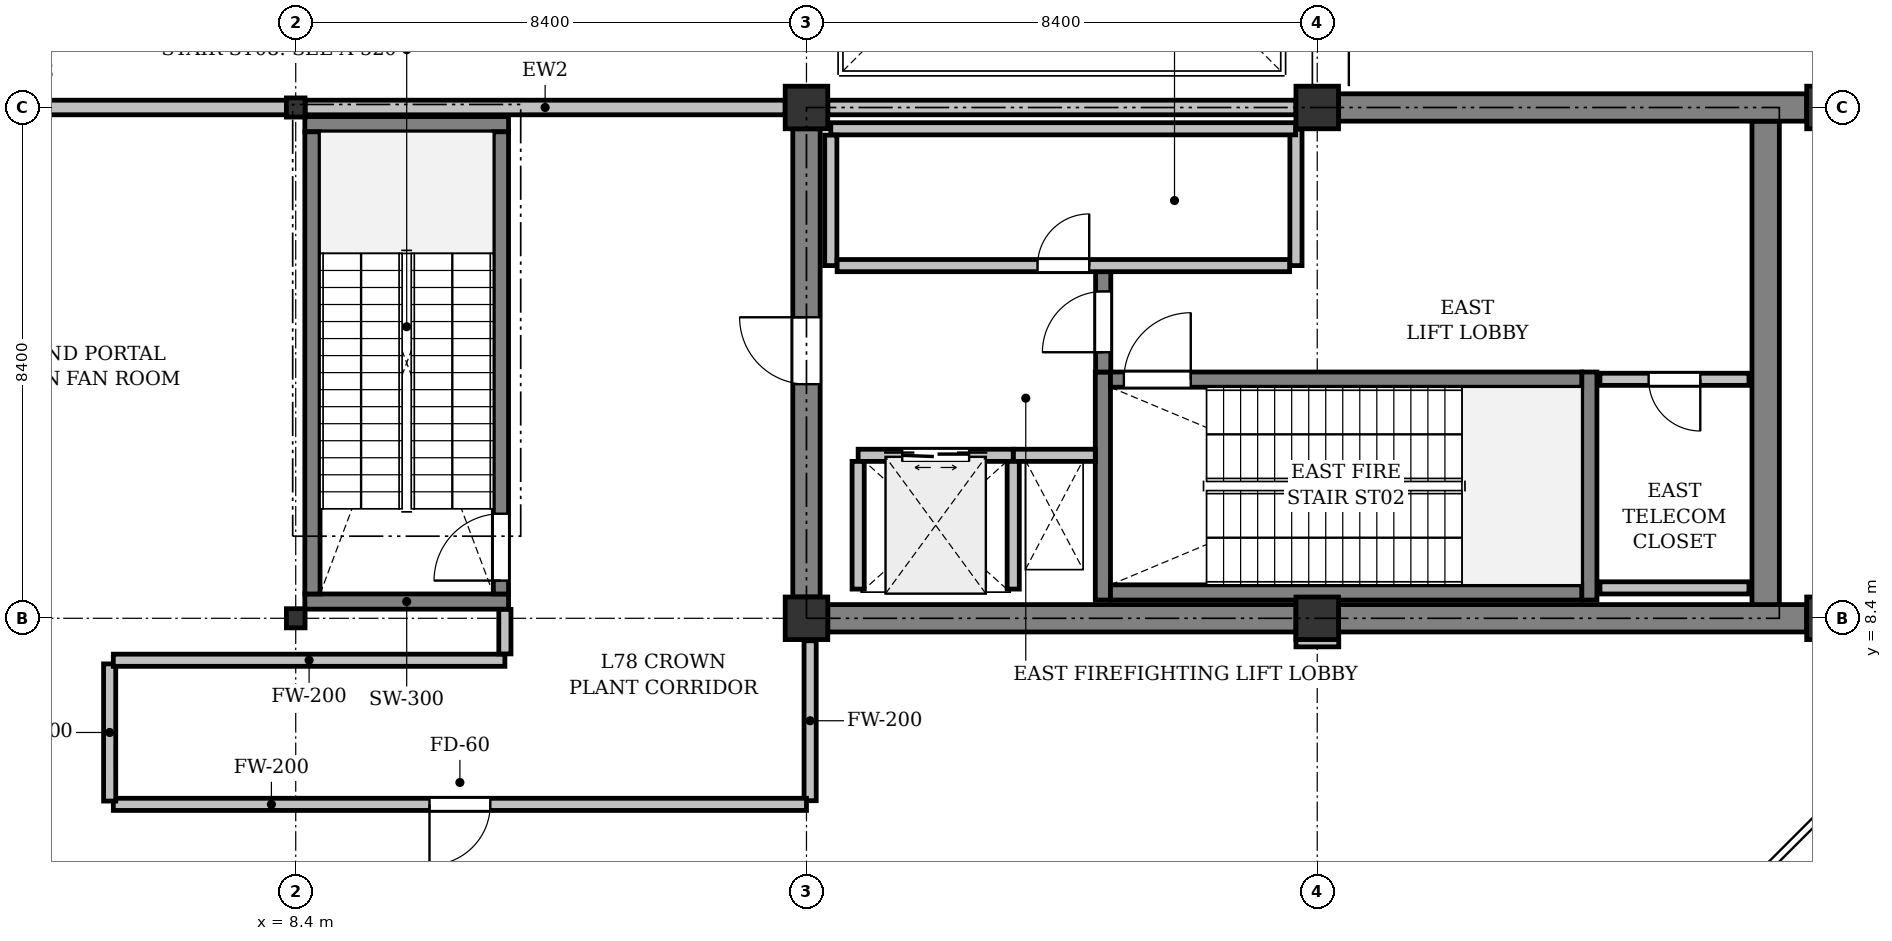
"""IFC4 building model, lengths in metres.
Left out: names, types, materials, properties, quantities, classifications, styles, units other than length and angle.
Written with IfcOpenShell. Run it as: python <this file> out.ifc"""

import sys

from ifc_helpers import new_model, si_unit, direction, frame, frame_2d, origin, origin_2d, place, context, subcontext, project, spatial, rectangle, i_section, extrude, element, fill, save


model = new_model("IFC4")
c1 = context("Model", 3, precision=1e-05, world=origin(), true_north=direction((0.0, 1.0)))
c2 = subcontext(c1, "Body", "Model", "MODEL_VIEW")
j1 = project(units=[si_unit("LENGTHUNIT", "METRE"), si_unit("PLANEANGLEUNIT", "RADIAN")], contexts=[c1])
p1 = place(None, origin())
s1 = spatial("IfcSite", under=j1, at=p1, CompositionType="ELEMENT")
p2 = place(p1, origin())
s2 = spatial("IfcBuilding", under=s1, at=p2, CompositionType="ELEMENT")
p3 = place(p2, frame((0.0, 0.0, 327.0)))
s3 = spatial("IfcBuildingStorey", under=s2, at=p3, CompositionType="ELEMENT", Elevation=327.0)
for number, where, z_axis, x_axis in (
    (1, (8.4, 8.4, 0.0), (0.0, 0.0, 1.0), (1.0, 0.0, 0.0)),
    (2, (8.4, 16.8, 0.0), (0.0, 0.0, 1.0), (1.0, 0.0, 0.0)),
):
    element("IfcColumn", number, at=place(p3, frame(where, z_axis=z_axis, x_axis=x_axis)), inside=s3, PredefinedType="COLUMN", context=c2, shape_type="SweptSolid", body=[
        extrude(i_section(OverallWidth=0.307, OverallDepth=0.315, WebThickness=0.012, FlangeThickness=0.019, FilletRadius=0.017, at=origin_2d()), origin(), (0.0, 0.0, 1.0), 5.725),
    ])
for number, where, z_axis, x_axis in (
    (3, (16.8, 8.4, 0.0), (0.0, 0.0, 1.0), (1.0, 0.0, 0.0)),
    (4, (16.8, 16.8, 0.0), (0.0, 0.0, 1.0), (1.0, 0.0, 0.0)),
    (5, (25.2, 8.4, 0.0), (0.0, 0.0, 1.0), (1.0, 0.0, 0.0)),
    (6, (25.2, 16.8, 0.0), (0.0, 0.0, 1.0), (1.0, 0.0, 0.0)),
    (7, (33.6, 8.4, 0.0), (0.0, 0.0, 1.0), (1.0, 0.0, 0.0)),
    (8, (33.6, 16.8, 0.0), (0.0, 0.0, 1.0), (1.0, 0.0, 0.0)),
):
    element("IfcColumn", number, at=place(p3, frame(where, z_axis=z_axis, x_axis=x_axis)), inside=s3, PredefinedType="COLUMN", context=c2, shape_type="SweptSolid", body=[
        extrude(rectangle(XDim=0.7, YDim=0.7, at=origin_2d()), origin(), (0.0, 0.0, 1.0), 5.725),
    ])
p4 = place(p3, frame((-0.12, 16.8, 0.0), z_axis=(0.0, 0.0, 1.0), x_axis=(1.0, 0.0, 0.0)))
e9 = element("IfcWall", 9, at=p4, inside=s3, PredefinedType="STANDARD", context=c2, shape_type="SweptSolid", body=[
    extrude(rectangle(XDim=8.367, YDim=0.24, at=frame_2d((4.183, 0.0))), origin(), (0.0, 0.0, 1.0), 5.725),
])
p5 = place(p3, frame((8.553, 16.8, 0.0), z_axis=(0.0, 0.0, 1.0), x_axis=(1.0, 0.0, 0.0)))
e10 = element("IfcWall", 10, at=p5, inside=s3, PredefinedType="STANDARD", context=c2, shape_type="SweptSolid", body=[
    extrude(rectangle(XDim=7.896, YDim=0.24, at=frame_2d((3.948, 0.0))), origin(), (0.0, 0.0, 1.0), 5.366),
])
p6 = place(p3, frame((17.15, 16.8, 0.0), z_axis=(0.0, 0.0, 1.0), x_axis=(1.0, 0.0, 0.0)))
e11 = element("IfcWall", 11, at=p6, inside=s3, PredefinedType="STANDARD", context=c2, shape_type="SweptSolid", body=[
    extrude(rectangle(XDim=7.7, YDim=0.24, at=frame_2d((3.85, 0.0))), origin(), (0.0, 0.0, 1.0), 5.366),
])
p7 = place(p3, frame((17.15, 8.4, 0.0), z_axis=(0.0, 0.0, 1.0), x_axis=(1.0, 0.0, 0.0)))
e12 = element("IfcWall", 12, at=p7, inside=s3, PredefinedType="SHEAR", context=c2, shape_type="SweptSolid", body=[
    extrude(rectangle(XDim=7.7, YDim=0.45, at=frame_2d((3.85, 0.0))), origin(), (0.0, 0.0, 1.0), 5.725),
])
p8 = place(p3, frame((25.55, 8.4, 0.0), z_axis=(0.0, 0.0, 1.0), x_axis=(1.0, 0.0, 0.0)))
e13 = element("IfcWall", 13, at=p8, inside=s3, PredefinedType="SHEAR", context=c2, shape_type="SweptSolid", body=[
    extrude(rectangle(XDim=7.7, YDim=0.45, at=frame_2d((3.85, 0.0))), origin(), (0.0, 0.0, 1.0), 5.725),
])
p9 = place(p3, frame((32.575, 8.625, 0.0), z_axis=(0.0, 0.0, 1.0), x_axis=(0.0, 1.0, 0.0)))
e14 = element("IfcWall", 14, at=p9, inside=s3, PredefinedType="SHEAR", context=c2, shape_type="SweptSolid", body=[
    extrude(rectangle(XDim=7.95, YDim=0.45, at=frame_2d((3.975, 0.0))), origin(), (0.0, 0.0, 1.0), 5.725),
])
p10 = place(p3, frame((16.8, 8.75, 0.0), z_axis=(0.0, 0.0, 1.0), x_axis=(0.0, 1.0, 0.0)))
e15 = element("IfcWall", 15, at=p10, inside=s3, PredefinedType="SHEAR", context=c2, shape_type="SweptSolid", body=[
    extrude(rectangle(XDim=7.7, YDim=0.45, at=frame_2d((3.85, 0.0))), origin(), (0.0, 0.0, 1.0), 5.725),
])
p11 = place(p10, frame((3.5, 0.0, 0.0)))
e16 = element("IfcOpeningElement", 16, at=p11, cuts=e15, PredefinedType="OPENING", context=c2, shape_type="SweptSolid", body=[
    extrude(rectangle(XDim=1.1, YDim=2.15, at=frame_2d((0.55, 1.075))), frame((0.0, 0.235, 0.0), z_axis=(0.0, -1.0, 0.0), x_axis=(1.0, 0.0, 0.0)), (0.0, 0.0, 1.0), 0.47),
])
p12 = place(p3, frame((25.55, 16.8, 0.0), z_axis=(0.0, 0.0, 1.0), x_axis=(1.0, 0.0, 0.0)))
e17 = element("IfcWall", 17, at=p12, inside=s3, PredefinedType="SHEAR", context=c2, shape_type="SweptSolid", body=[
    extrude(rectangle(XDim=7.7, YDim=0.45, at=frame_2d((3.85, 0.0))), origin(), (0.0, 0.0, 1.0), 5.725),
])
for number, where, z_axis, x_axis in (
    (18, (21.675, 8.7, 0.0), (0.0, 0.0, 1.0), (0.0, 1.0, 0.0)),
    (19, (29.675, 8.7, 0.0), (0.0, 0.0, 1.0), (0.0, 1.0, 0.0)),
):
    element("IfcWall", number, at=place(p3, frame(where, z_axis=z_axis, x_axis=x_axis)), inside=s3, PredefinedType="SHEAR", context=c2, shape_type="SweptSolid", body=[
        extrude(rectangle(XDim=3.75, YDim=0.25, at=frame_2d((1.875, 0.0))), origin(), (0.0, 0.0, 1.0), 5.725),
    ])
p13 = place(p3, frame((21.8, 8.825, 0.0), z_axis=(0.0, 0.0, 1.0), x_axis=(1.0, 0.0, 0.0)))
e20 = element("IfcWall", 20, at=p13, inside=s3, PredefinedType="SHEAR", context=c2, shape_type="SweptSolid", body=[
    extrude(rectangle(XDim=7.75, YDim=0.25, at=frame_2d((3.875, 0.0))), origin(), (0.0, 0.0, 1.0), 5.725),
])
p14 = place(p3, frame((21.8, 12.325, 0.0), z_axis=(0.0, 0.0, 1.0), x_axis=(1.0, 0.0, 0.0)))
e21 = element("IfcWall", 21, at=p14, inside=s3, PredefinedType="SHEAR", context=c2, shape_type="SweptSolid", body=[
    extrude(rectangle(XDim=7.75, YDim=0.25, at=frame_2d((3.875, 0.0))), origin(), (0.0, 0.0, 1.0), 5.725),
])
p15 = place(p14, frame((0.22, 0.0, 0.0)))
e22 = element("IfcOpeningElement", 22, at=p15, cuts=e21, PredefinedType="OPENING", context=c2, shape_type="SweptSolid", body=[
    extrude(rectangle(XDim=1.1, YDim=2.15, at=frame_2d((0.55, 1.075))), frame((0.0, 0.135, 0.0), z_axis=(0.0, -1.0, 0.0), x_axis=(1.0, 0.0, 0.0)), (0.0, 0.0, 1.0), 0.27),
])
for number, where, z_axis, x_axis in (
    (23, (11.9, 8.675, -0.35), (0.0, 0.0, 1.0), (-1.0, 0.0, 0.0)),
    (24, (11.9, 16.525, -0.35), (0.0, 0.0, 1.0), (-1.0, 0.0, 0.0)),
):
    element("IfcWall", number, at=place(p3, frame(where, z_axis=z_axis, x_axis=x_axis)), inside=s3, PredefinedType="SHEAR", context=c2, shape_type="SweptSolid", body=[
        extrude(rectangle(XDim=3.35, YDim=0.25, at=frame_2d((1.675, 0.0))), origin(), (0.0, 0.0, 1.0), 6.075),
    ])
p16 = place(p3, frame((11.775, 8.8, -0.35), z_axis=(0.0, 0.0, 1.0), x_axis=(0.0, 1.0, 0.0)))
e25 = element("IfcWall", 25, at=p16, inside=s3, PredefinedType="SHEAR", context=c2, shape_type="SweptSolid", body=[
    extrude(rectangle(XDim=7.6, YDim=0.25, at=frame_2d((3.8, 0.0))), origin(), (0.0, 0.0, 1.0), 6.075),
])
p17 = place(p16, frame((0.22, 0.0, 0.35)))
e26 = element("IfcOpeningElement", 26, at=p17, cuts=e25, PredefinedType="OPENING", context=c2, shape_type="SweptSolid", body=[
    extrude(rectangle(XDim=1.1, YDim=2.15, at=frame_2d((0.55, 1.075))), frame((0.0, 0.135, 0.0), z_axis=(0.0, -1.0, 0.0), x_axis=(1.0, 0.0, 0.0)), (0.0, 0.0, 1.0), 0.27),
])
p18 = place(p3, frame((8.675, 8.8, -0.35), z_axis=(0.0, 0.0, 1.0), x_axis=(0.0, 1.0, 0.0)))
e27 = element("IfcWall", 27, at=p18, inside=s3, PredefinedType="SHEAR", context=c2, shape_type="SweptSolid", body=[
    extrude(rectangle(XDim=7.6, YDim=0.25, at=frame_2d((3.8, 0.0))), origin(), (0.0, 0.0, 1.0), 6.075),
])
p19 = place(p3, frame((20.2, 11.08, 0.0), z_axis=(0.0, 0.0, 1.0), x_axis=(1.0, 0.0, 0.0)))
e28 = element("IfcWall", 28, at=p19, inside=s3, PredefinedType="PARTITIONING", context=c2, shape_type="SweptSolid", body=[
    extrude(rectangle(XDim=1.35, YDim=0.2, at=frame_2d((0.675, 0.0))), origin(), (0.0, 0.0, 1.0), 5.725),
])
p20 = place(p3, frame((21.68, 12.45, 0.0), z_axis=(0.0, 0.0, 1.0), x_axis=(0.0, 1.0, 0.0)))
e29 = element("IfcWall", 29, at=p20, inside=s3, PredefinedType="SHEAR", context=c2, shape_type="SweptSolid", body=[
    extrude(rectangle(XDim=1.65, YDim=0.25, at=frame_2d((0.825, 0.0))), origin(), (0.0, 0.0, 1.0), 5.725),
])
p21 = place(p20, frame((0.325, 0.0, 0.0)))
e30 = element("IfcOpeningElement", 30, at=p21, cuts=e29, PredefinedType="OPENING", context=c2, shape_type="SweptSolid", body=[
    extrude(rectangle(XDim=1.0, YDim=2.15, at=frame_2d((0.5, 1.075))), frame((0.0, 0.135, 0.0), z_axis=(0.0, -1.0, 0.0), x_axis=(1.0, 0.0, 0.0)), (0.0, 0.0, 1.0), 0.27),
])
p22 = place(p3, frame((17.65, 11.08, 0.0), z_axis=(0.0, 0.0, 1.0), x_axis=(1.0, 0.0, 0.0)))
e31 = element("IfcWall", 31, at=p22, inside=s3, PredefinedType="PARTITIONING", context=c2, shape_type="SweptSolid", body=[
    extrude(rectangle(XDim=2.55, YDim=0.2, at=frame_2d((1.275, 0.0))), origin(), (0.0, 0.0, 1.0), 5.725),
])
p23 = place(p22, frame((0.725, 0.0, 0.0)))
e32 = element("IfcOpeningElement", 32, at=p23, cuts=e31, PredefinedType="OPENING", context=c2, shape_type="SweptSolid", body=[
    extrude(rectangle(XDim=1.1, YDim=2.2, at=frame_2d((0.55, 1.1))), frame((0.0, 0.11, 0.0), z_axis=(0.0, -1.0, 0.0), x_axis=(1.0, 0.0, 0.0)), (0.0, 0.0, 1.0), 0.22),
])
for number, where, z_axis, x_axis in (
    (33, (20.2, 8.88, 0.0), (0.0, 0.0, 1.0), (0.0, 1.0, 0.0)),
    (34, (17.65, 8.88, 0.0), (0.0, 0.0, 1.0), (0.0, 1.0, 0.0)),
):
    element("IfcWall", number, at=place(p3, frame(where, z_axis=z_axis, x_axis=x_axis)), inside=s3, PredefinedType="PARTITIONING", context=c2, shape_type="SweptSolid", body=[
        extrude(rectangle(XDim=2.1, YDim=0.2, at=frame_2d((1.05, 0.0))), origin(), (0.0, 0.0, 1.0), 5.725),
    ])
p24 = place(p3, frame((24.85, 14.2, 0.0), z_axis=(0.0, 0.0, 1.0), x_axis=(0.0, 1.0, 0.0)))
e35 = element("IfcWall", 35, at=p24, inside=s3, PredefinedType="PARTITIONING", context=c2, shape_type="SweptSolid", body=[
    extrude(rectangle(XDim=2.245, YDim=0.2, at=frame_2d((1.123, 0.0))), origin(), (0.0, 0.0, 1.0), 5.725),
])
p25 = place(p3, frame((24.845, 16.45, 0.0), z_axis=(0.0, 0.0, 1.0), x_axis=(-1.0, 0.0, 0.0)))
e36 = element("IfcWall", 36, at=p25, inside=s3, PredefinedType="PARTITIONING", context=c2, shape_type="SweptSolid", body=[
    extrude(rectangle(XDim=7.645, YDim=0.2, at=frame_2d((3.823, 0.0))), origin(), (0.0, 0.0, 1.0), 5.725),
])
p26 = place(p3, frame((17.2, 16.346, 0.0), z_axis=(0.0, 0.0, 1.0), x_axis=(0.0, -1.0, 0.0)))
e37 = element("IfcWall", 37, at=p26, inside=s3, PredefinedType="PARTITIONING", context=c2, shape_type="SweptSolid", body=[
    extrude(rectangle(XDim=2.146, YDim=0.2, at=frame_2d((1.073, 0.0))), origin(), (0.0, 0.0, 1.0), 5.725),
])
p27 = place(p3, frame((17.304, 14.2, 0.0), z_axis=(0.0, 0.0, 1.0), x_axis=(1.0, 0.0, 0.0)))
e38 = element("IfcWall", 38, at=p27, inside=s3, PredefinedType="PARTITIONING", context=c2, shape_type="SweptSolid", body=[
    extrude(rectangle(XDim=7.442, YDim=0.2, at=frame_2d((3.721, 0.0))), origin(), (0.0, 0.0, 1.0), 5.725),
])
p28 = place(p27, frame((3.296, 0.0, 0.0)))
e39 = element("IfcOpeningElement", 39, at=p28, cuts=e38, PredefinedType="OPENING", context=c2, shape_type="SweptSolid", body=[
    extrude(rectangle(XDim=0.85, YDim=2.15, at=frame_2d((0.425, 1.075))), frame((0.0, 0.11, 0.0), z_axis=(0.0, -1.0, 0.0), x_axis=(1.0, 0.0, 0.0)), (0.0, 0.0, 1.0), 0.22),
])
p29 = place(p3, frame((32.3, 12.33, 0.0), z_axis=(0.0, 0.0, 1.0), x_axis=(-1.0, 0.0, 0.0)))
e40 = element("IfcWall", 40, at=p29, inside=s3, PredefinedType="PARTITIONING", context=c2, shape_type="SweptSolid", body=[
    extrude(rectangle(XDim=2.45, YDim=0.2, at=frame_2d((1.225, 0.0))), origin(), (0.0, 0.0, 1.0), 5.725),
])
p30 = place(p29, frame((0.8, 0.0, 0.0)))
e41 = element("IfcOpeningElement", 41, at=p30, cuts=e40, PredefinedType="OPENING", context=c2, shape_type="SweptSolid", body=[
    extrude(rectangle(XDim=0.85, YDim=2.15, at=frame_2d((0.425, 1.075))), frame((0.0, 0.11, 0.0), z_axis=(0.0, -1.0, 0.0), x_axis=(1.0, 0.0, 0.0)), (0.0, 0.0, 1.0), 0.22),
])
p31 = place(p3, frame((29.85, 8.9, 0.0), z_axis=(0.0, 0.0, 1.0), x_axis=(1.0, 0.0, 0.0)))
e42 = element("IfcWall", 42, at=p31, inside=s3, PredefinedType="PARTITIONING", context=c2, shape_type="SweptSolid", body=[
    extrude(rectangle(XDim=2.45, YDim=0.2, at=frame_2d((1.225, 0.0))), origin(), (0.0, 0.0, 1.0), 5.725),
])
p32 = place(p3, frame((25.554, 8.031, 0.0), z_axis=(0.0, 0.0, 1.0), x_axis=(-0.999999759375, -0.000693721651, 0.0)))
e43 = element("IfcWall", 43, at=p32, inside=s3, PredefinedType="PARTITIONING", context=c2, shape_type="SweptSolid", body=[
    extrude(rectangle(XDim=0.704, YDim=0.2, at=frame_2d((0.352, 0.0))), origin(), (0.0, 0.0, 1.0), 5.725),
])
p33 = place(p3, frame((16.86, 8.03, 0.0), z_axis=(0.0, 0.0, 1.0), x_axis=(0.0, -1.0, 0.0)))
e44 = element("IfcWall", 44, at=p33, inside=s3, PredefinedType="PARTITIONING", context=c2, shape_type="SweptSolid", body=[
    extrude(rectangle(XDim=2.63, YDim=0.2, at=frame_2d((1.315, 0.0))), origin(), (0.0, 0.0, 1.0), 5.725),
])
p34 = place(p3, frame((16.8, 5.34, 0.0), z_axis=(0.0, 0.0, 1.0), x_axis=(-1.0, 0.0, 0.0)))
e45 = element("IfcWall", 45, at=p34, inside=s3, PredefinedType="PARTITIONING", context=c2, shape_type="SweptSolid", body=[
    extrude(rectangle(XDim=11.4, YDim=0.2, at=frame_2d((5.7, 0.0))), origin(), (0.0, 0.0, 1.0), 5.725),
])
p35 = place(p34, frame((5.2, 0.0, 0.0)))
e46 = element("IfcOpeningElement", 46, at=p35, cuts=e45, PredefinedType="OPENING", context=c2, shape_type="SweptSolid", body=[
    extrude(rectangle(XDim=1.0, YDim=2.15, at=frame_2d((0.5, 1.075))), frame((0.0, 0.11, 0.0), z_axis=(0.0, -1.0, 0.0), x_axis=(1.0, 0.0, 0.0)), (0.0, 0.0, 1.0), 0.22),
])
p36 = place(p3, frame((5.34, 5.394, 0.0), z_axis=(0.0, 0.0, 1.0), x_axis=(-0.000108225108, 0.999999994144, 0.0)))
e47 = element("IfcWall", 47, at=p36, inside=s3, PredefinedType="PARTITIONING", context=c2, shape_type="SweptSolid", body=[
    extrude(rectangle(XDim=2.256, YDim=0.2, at=frame_2d((1.128, 0.0))), origin(), (0.0, 0.0, 1.0), 5.725),
])
p37 = place(p3, frame((5.4, 7.71, 0.0), z_axis=(0.0, 0.0, 1.0), x_axis=(1.0, 0.0, 0.0)))
e48 = element("IfcWall", 48, at=p37, inside=s3, PredefinedType="PARTITIONING", context=c2, shape_type="SweptSolid", body=[
    extrude(rectangle(XDim=6.44, YDim=0.2, at=frame_2d((3.22, 0.0))), origin(), (0.0, 0.0, 1.0), 5.725),
])
p38 = place(p3, frame((11.84, 7.814, 0.0), z_axis=(0.0, 0.0, 1.0), x_axis=(0.0, 1.0, 0.0)))
e49 = element("IfcWall", 49, at=p38, inside=s3, PredefinedType="PARTITIONING", context=c2, shape_type="SweptSolid", body=[
    extrude(rectangle(XDim=0.732, YDim=0.2, at=frame_2d((0.366, 0.0))), origin(), (0.0, 0.0, 1.0), 5.366),
])
p39 = place(p11, origin())
e50 = element("IfcDoor", 50, at=p39, inside=s3, OperationType="SINGLE_SWING_RIGHT", PredefinedType="DOOR", context=c2, shape_type="SweptSolid", body=[
    extrude(rectangle(XDim=1.1, YDim=2.15, at=frame_2d((0.55, 1.075))), frame((0.0, 0.025, 0.0), z_axis=(0.0, -1.0, 0.0), x_axis=(1.0, 0.0, 0.0)), (0.0, 0.0, 1.0), 0.05),
])
fill(e16, e50)
p40 = place(p15, origin())
e51 = element("IfcDoor", 51, at=p40, inside=s3, OperationType="SINGLE_SWING_RIGHT", PredefinedType="DOOR", context=c2, shape_type="SweptSolid", body=[
    extrude(rectangle(XDim=1.1, YDim=2.15, at=frame_2d((0.55, 1.075))), frame((0.0, 0.025, 0.0), z_axis=(0.0, -1.0, 0.0), x_axis=(1.0, 0.0, 0.0)), (0.0, 0.0, 1.0), 0.05),
])
fill(e22, e51)
p41 = place(p17, origin())
e52 = element("IfcDoor", 52, at=p41, inside=s3, OperationType="SINGLE_SWING_LEFT", PredefinedType="DOOR", context=c2, shape_type="SweptSolid", body=[
    extrude(rectangle(XDim=1.1, YDim=2.15, at=frame_2d((0.55, 1.075))), frame((0.0, 0.025, 0.0), z_axis=(0.0, -1.0, 0.0), x_axis=(1.0, 0.0, 0.0)), (0.0, 0.0, 1.0), 0.05),
])
fill(e26, e52)
p42 = place(p21, origin())
e53 = element("IfcDoor", 53, at=p42, inside=s3, OperationType="SINGLE_SWING_LEFT", PredefinedType="DOOR", context=c2, shape_type="SweptSolid", body=[
    extrude(rectangle(XDim=1.0, YDim=2.15, at=frame_2d((0.5, 1.075))), frame((0.0, 0.025, 0.0), z_axis=(0.0, -1.0, 0.0), x_axis=(1.0, 0.0, 0.0)), (0.0, 0.0, 1.0), 0.05),
])
fill(e30, e53)
p43 = place(p23, origin())
e54 = element("IfcDoor", 54, at=p43, inside=s3, OperationType="DOUBLE_DOOR_SLIDING", PredefinedType="DOOR", context=c2, shape_type="SweptSolid", body=[
    extrude(rectangle(XDim=1.1, YDim=2.2, at=frame_2d((0.55, 1.1))), frame((0.0, 0.025, 0.0), z_axis=(0.0, -1.0, 0.0), x_axis=(1.0, 0.0, 0.0)), (0.0, 0.0, 1.0), 0.05),
])
fill(e32, e54)
p44 = place(p28, origin())
e55 = element("IfcDoor", 55, at=p44, inside=s3, OperationType="SINGLE_SWING_RIGHT", PredefinedType="DOOR", context=c2, shape_type="SweptSolid", body=[
    extrude(rectangle(XDim=0.85, YDim=2.15, at=frame_2d((0.425, 1.075))), frame((0.0, 0.025, 0.0), z_axis=(0.0, -1.0, 0.0), x_axis=(1.0, 0.0, 0.0)), (0.0, 0.0, 1.0), 0.05),
])
fill(e39, e55)
p45 = place(p30, origin())
e56 = element("IfcDoor", 56, at=p45, inside=s3, OperationType="SINGLE_SWING_LEFT", PredefinedType="DOOR", context=c2, shape_type="SweptSolid", body=[
    extrude(rectangle(XDim=0.85, YDim=2.15, at=frame_2d((0.425, 1.075))), frame((0.0, 0.025, 0.0), z_axis=(0.0, -1.0, 0.0), x_axis=(1.0, 0.0, 0.0)), (0.0, 0.0, 1.0), 0.05),
])
fill(e41, e56)
p46 = place(p35, origin())
e57 = element("IfcDoor", 57, at=p46, inside=s3, OperationType="SINGLE_SWING_RIGHT", PredefinedType="DOOR", context=c2, shape_type="SweptSolid", body=[
    extrude(rectangle(XDim=1.0, YDim=2.15, at=frame_2d((0.5, 1.075))), frame((0.0, 0.025, 0.0), z_axis=(0.0, -1.0, 0.0), x_axis=(1.0, 0.0, 0.0)), (0.0, 0.0, 1.0), 0.05),
])
fill(e46, e57)
save(model, sys.argv[1])
